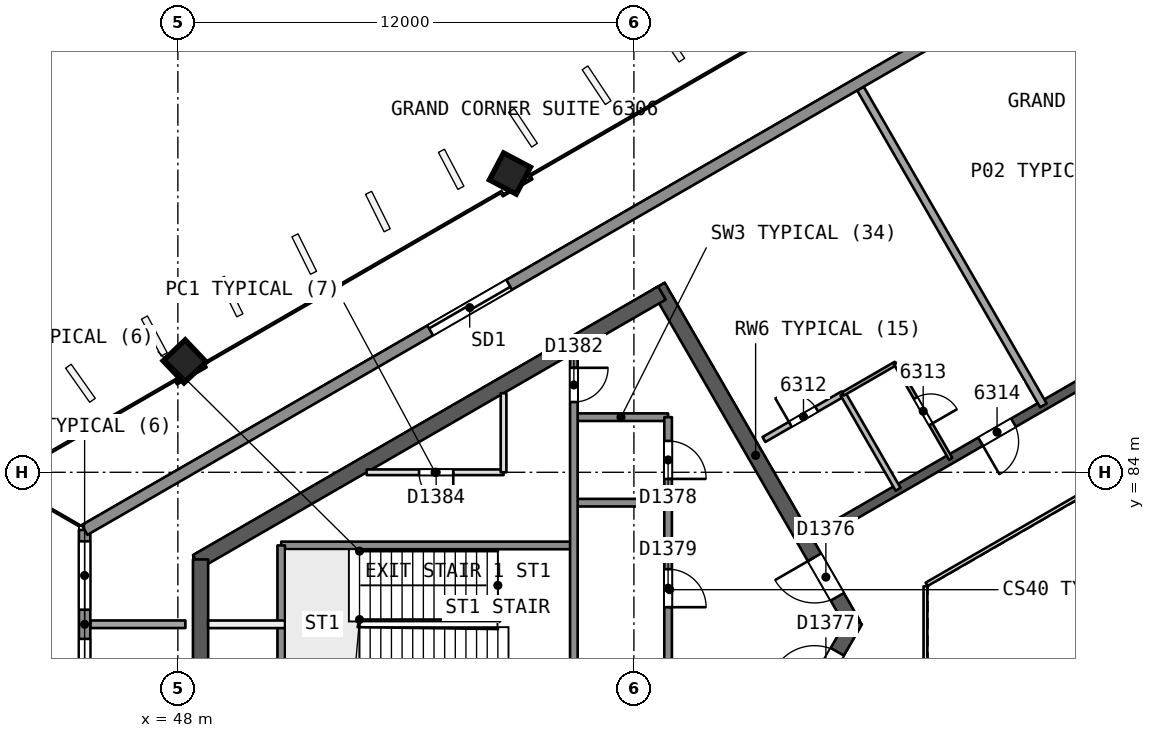
"""IFC4 building model, lengths in metres.
Left out: names, types, materials, properties, quantities, classifications, styles, units other than length and angle.
Written with IfcOpenShell. Run it as: python <this file> out.ifc"""

import sys

from ifc_helpers import new_model, si_unit, direction, frame, frame_2d, origin, origin_2d, place, context, subcontext, project, spatial, rectangle, extrude, element, fill, save


model = new_model("IFC4")
c1 = context("Model", 3, precision=1e-05, world=origin(), true_north=direction((0.0, 1.0)))
c2 = subcontext(c1, "Body", "Model", "MODEL_VIEW")
j1 = project(units=[si_unit("LENGTHUNIT", "METRE"), si_unit("PLANEANGLEUNIT", "RADIAN")], contexts=[c1])
p1 = place(None, origin())
s1 = spatial("IfcSite", under=j1, at=p1, CompositionType="ELEMENT")
p2 = place(p1, origin())
s2 = spatial("IfcBuilding", under=s1, at=p2, CompositionType="ELEMENT")
p3 = place(p2, frame((0.0, 0.0, 259.0)))
s3 = spatial("IfcBuildingStorey", under=s2, at=p3, CompositionType="ELEMENT", Elevation=259.0)
p4 = place(p3, frame((65.769, 80.0, 0.0), z_axis=(0.0, 0.0, 1.0), x_axis=(-0.50000177223, 0.866024380585, 0.0)))
e1 = element("IfcWall", 1, at=p4, inside=s3, PredefinedType="SHEAR", context=c2, shape_type="SweptSolid", body=[
    extrude(rectangle(XDim=10.265, YDim=0.4, at=frame_2d((5.132, 0.0))), origin(), (0.0, 0.0, 1.0), 3.7),
])
p5 = place(p4, frame((0.834, 0.0, 0.0)))
e2 = element("IfcOpeningElement", 2, at=p5, cuts=e1, PredefinedType="OPENING", context=c2, shape_type="SweptSolid", body=[
    extrude(rectangle(XDim=1.2, YDim=2.1, at=frame_2d((0.6, 1.05))), frame((0.0, 0.21, 0.0), z_axis=(0.0, -1.0, 0.0), x_axis=(1.0, 0.0, 0.0)), (0.0, 0.0, 1.0), 0.421),
])
p6 = place(p3, frame((60.737, 88.716, 0.0), z_axis=(0.0, 0.0, 1.0), x_axis=(-0.866028812667, -0.499994095595, 0.0)))
e3 = element("IfcWall", 3, at=p6, inside=s3, PredefinedType="SHEAR", context=c2, shape_type="SweptSolid", body=[
    extrude(rectangle(XDim=14.134, YDim=0.4, at=frame_2d((7.067, 0.0))), origin(), (0.0, 0.0, 1.0), 3.7),
])
p7 = place(p3, frame((48.597, 81.707, 0.0), z_axis=(0.0, 0.0, 1.0), x_axis=(0.0, -1.0, 0.0)))
e4 = element("IfcWall", 4, at=p7, inside=s3, PredefinedType="SHEAR", context=c2, shape_type="SweptSolid", body=[
    extrude(rectangle(XDim=3.53, YDim=0.4, at=frame_2d((1.765, 0.0))), origin(), (0.0, 0.0, 1.0), 3.7),
])
p8 = place(p3, frame((60.737, 71.284, 0.0), z_axis=(0.0, 0.0, 1.0), x_axis=(0.50000547566, 0.866022242388, 0.0)))
e5 = element("IfcWall", 5, at=p8, inside=s3, PredefinedType="SHEAR", context=c2, shape_type="SweptSolid", body=[
    extrude(rectangle(XDim=10.18, YDim=0.4, at=frame_2d((5.09, 0.0))), origin(), (0.0, 0.0, 1.0), 3.7),
])
p9 = place(p8, frame((8.03, 0.0, 0.0)))
e6 = element("IfcOpeningElement", 6, at=p9, cuts=e5, PredefinedType="OPENING", context=c2, shape_type="SweptSolid", body=[
    extrude(rectangle(XDim=1.2, YDim=2.1, at=frame_2d((0.6, 1.05))), frame((0.0, 0.21, 0.0), z_axis=(0.0, -1.0, 0.0), x_axis=(1.0, 0.0, 0.0)), (0.0, 0.0, 1.0), 0.421),
])
p10 = place(p3, frame((78.2, 90.046, 0.0), z_axis=(0.0, 0.0, 1.0), x_axis=(-0.866026492143, -0.499998114903, 0.0)))
e7 = element("IfcWall", 7, at=p10, inside=s3, PredefinedType="SHEAR", context=c2, shape_type="SweptSolid", body=[
    extrude(rectangle(XDim=15.588, YDim=0.25, at=frame_2d((7.794, 0.0))), origin(), (0.0, 0.0, 1.0), 3.3),
])
p11 = place(p10, frame((5.887, 0.0, 0.0)))
e8 = element("IfcOpeningElement", 8, at=p11, cuts=e7, PredefinedType="OPENING", context=c2, shape_type="SweptSolid", body=[
    extrude(rectangle(XDim=1.0, YDim=2.1, at=frame_2d((0.5, 1.05))), frame((0.0, 0.135, 0.0), z_axis=(0.0, -1.0, 0.0), x_axis=(1.0, 0.0, 0.0)), (0.0, 0.0, 1.0), 0.271),
])
p12 = place(p10, frame((9.481, 0.0, 0.0)))
e9 = element("IfcOpeningElement", 9, at=p12, cuts=e7, PredefinedType="OPENING", context=c2, shape_type="SweptSolid", body=[
    extrude(rectangle(XDim=1.0, YDim=2.1, at=frame_2d((0.5, 1.05))), frame((0.0, 0.135, 0.0), z_axis=(0.0, -1.0, 0.0), x_axis=(1.0, 0.0, 0.0)), (0.0, 0.0, 1.0), 0.271),
])
p13 = place(p3, frame((56.715, 91.875, 0.0), z_axis=(0.019328501455, -0.012204002625, 0.999738701537), x_axis=(-0.498096589224, 0.866885952098, 0.020212220507)))
e10 = element("IfcColumn", 10, at=p13, inside=s3, PredefinedType="COLUMN", context=c2, shape_type="SweptSolid", body=[
    extrude(rectangle(XDim=0.8, YDim=0.8, at=origin_2d()), origin(), (0.0, 0.0, 1.0), 3.701),
])
p14 = place(p3, frame((48.143, 86.926, 0.0), z_axis=(0.028559101991, -0.006859460986, 0.999568569678), x_axis=(-0.49850746064, 0.866650252321, 0.020190389752)))
e11 = element("IfcColumn", 11, at=p14, inside=s3, PredefinedType="COLUMN", context=c2, shape_type="SweptSolid", body=[
    extrude(rectangle(XDim=0.8, YDim=0.8, at=origin_2d()), origin(), (0.0, 0.0, 1.0), 3.702),
])
p15 = place(p3, frame((65.961, 94.097, 0.0), z_axis=(0.0, 0.0, 1.0), x_axis=(0.499987326052, -0.866032720968, 0.0)))
e12 = element("IfcWall", 12, at=p15, inside=s3, PredefinedType="PARTITIONING", context=c2, shape_type="SweptSolid", body=[
    extrude(rectangle(XDim=9.628, YDim=0.2, at=frame_2d((4.814, 0.0))), origin(), (0.0, 0.0, 1.0), 3.3),
])
p16 = place(p3, frame((63.422, 84.863, 0.0), z_axis=(0.0, 0.0, 1.0), x_axis=(0.865994240961, 0.500053971709, 0.0)))
e13 = element("IfcWall", 13, at=p16, inside=s3, PredefinedType="PARTITIONING", context=c2, shape_type="SweptSolid", body=[
    extrude(rectangle(XDim=2.401, YDim=0.15, at=frame_2d((1.201, 0.0))), origin(), (0.0, 0.0, 1.0), 3.3),
])
p17 = place(p16, frame((0.801, 0.0, 0.0)))
e14 = element("IfcOpeningElement", 14, at=p17, cuts=e13, PredefinedType="OPENING", context=c2, shape_type="SweptSolid", body=[
    extrude(rectangle(XDim=0.8, YDim=2.1, at=frame_2d((0.4, 1.05))), frame((0.0, 0.085, 0.0), z_axis=(0.0, -1.0, 0.0), x_axis=(1.0, 0.0, 0.0)), (0.0, 0.0, 1.0), 0.171),
])
p18 = place(p3, frame((65.502, 86.063, 0.0), z_axis=(0.0, 0.0, 1.0), x_axis=(0.866055983265, 0.499947031044, 0.0)))
e15 = element("IfcWall", 15, at=p18, inside=s3, PredefinedType="PARTITIONING", context=c2, shape_type="SweptSolid", body=[
    extrude(rectangle(XDim=1.6, YDim=0.1, at=frame_2d((0.8, 0.0))), origin(), (0.0, 0.0, 1.0), 3.3),
])
p19 = place(p3, frame((66.887, 86.863, 0.0), z_axis=(0.0, 0.0, 1.0), x_axis=(0.50005036918, -0.865996321171, 0.0)))
e16 = element("IfcWall", 16, at=p19, inside=s3, PredefinedType="PARTITIONING", context=c2, shape_type="SweptSolid", body=[
    extrude(rectangle(XDim=2.9, YDim=0.1, at=frame_2d((1.45, 0.0))), origin(), (0.0, 0.0, 1.0), 3.3),
])
p20 = place(p19, frame((1.05, 0.0, 0.0)))
e17 = element("IfcOpeningElement", 17, at=p20, cuts=e16, PredefinedType="OPENING", context=c2, shape_type="SweptSolid", body=[
    extrude(rectangle(XDim=0.8, YDim=2.1, at=frame_2d((0.4, 1.05))), frame((0.0, 0.061, 0.0), z_axis=(0.0, -1.0, 0.0), x_axis=(1.0, 0.0, 0.0)), (0.0, 0.0, 1.0), 0.121),
])
p21 = place(p3, frame((45.695, 80.001, 0.0), z_axis=(0.0, 0.0, 1.0), x_axis=(1.0, 0.0, 0.0)))
e18 = element("IfcWall", 18, at=p21, inside=s3, PredefinedType="PARTITIONING", context=c2, shape_type="SweptSolid", body=[
    extrude(rectangle(XDim=2.503, YDim=0.2, at=frame_2d((1.251, 0.0))), origin(), (0.0, 0.0, 1.0), 3.3),
])
p22 = place(p3, frame((66.952, 83.552, 0.0), z_axis=(0.0, 0.0, 1.0), x_axis=(-0.499987231761, 0.866032775405, 0.0)))
e19 = element("IfcWall", 19, at=p22, inside=s3, PredefinedType="PARTITIONING", context=c2, shape_type="SweptSolid", body=[
    extrude(rectangle(XDim=2.9, YDim=0.15, at=frame_2d((1.45, 0.0))), origin(), (0.0, 0.0, 1.0), 3.3),
])
p23 = place(p3, frame((45.546, 77.518, 0.0), z_axis=(0.0, 0.0, 1.0), x_axis=(0.0, 1.0, 0.0)))
e20 = element("IfcWall", 20, at=p23, inside=s3, PredefinedType="SOLIDWALL", context=c2, shape_type="SweptSolid", body=[
    extrude(rectangle(XDim=4.965, YDim=0.3, at=frame_2d((2.482, 0.0))), origin(), (0.0, 0.0, 1.0), 3.3),
])
p24 = place(p23, frame((2.866, 0.0, 0.9)))
e21 = element("IfcOpeningElement", 21, at=p24, cuts=e20, PredefinedType="OPENING", context=c2, shape_type="SweptSolid", body=[
    extrude(rectangle(XDim=1.8, YDim=1.5, at=frame_2d((0.9, 0.75))), frame((0.0, 0.161, 0.0), z_axis=(0.0, -1.0, 0.0), x_axis=(1.0, 0.0, 0.0)), (0.0, 0.0, 1.0), 0.321),
])
p25 = place(p23, frame((0.298, 0.0, 0.9)))
e22 = element("IfcOpeningElement", 22, at=p25, cuts=e20, PredefinedType="OPENING", context=c2, shape_type="SweptSolid", body=[
    extrude(rectangle(XDim=1.8, YDim=1.5, at=frame_2d((0.9, 0.75))), frame((0.0, 0.161, 0.0), z_axis=(0.0, -1.0, 0.0), x_axis=(1.0, 0.0, 0.0)), (0.0, 0.0, 1.0), 0.321),
])
p26 = place(p3, frame((45.546, 82.482, 0.0), z_axis=(0.0, 0.0, 1.0), x_axis=(0.86602550179, 0.499999830249, 0.0)))
e23 = element("IfcWall", 23, at=p26, inside=s3, PredefinedType="SOLIDWALL", context=c2, shape_type="SweptSolid", body=[
    extrude(rectangle(XDim=48.533, YDim=0.3, at=frame_2d((24.267, 0.0))), origin(), (0.0, 0.0, 1.0), 3.3),
])
p27 = place(p26, frame((34.854, 0.0, 0.0)))
e24 = element("IfcOpeningElement", 24, at=p27, cuts=e23, PredefinedType="OPENING", context=c2, shape_type="SweptSolid", body=[
    extrude(rectangle(XDim=2.4, YDim=2.4, at=frame_2d((1.2, 1.2))), frame((0.0, 0.161, 0.0), z_axis=(0.0, -1.0, 0.0), x_axis=(1.0, 0.0, 0.0)), (0.0, 0.0, 1.0), 0.321),
])
p28 = place(p26, frame((10.5, 0.0, 0.0)))
e25 = element("IfcOpeningElement", 25, at=p28, cuts=e23, PredefinedType="OPENING", context=c2, shape_type="SweptSolid", body=[
    extrude(rectangle(XDim=2.4, YDim=2.4, at=frame_2d((1.2, 1.2))), frame((0.0, 0.161, 0.0), z_axis=(0.0, -1.0, 0.0), x_axis=(1.0, 0.0, 0.0)), (0.0, 0.0, 1.0), 0.321),
])
p29 = place(p3, frame((60.9, 85.45, 0.0), z_axis=(0.0, 0.0, 1.0), x_axis=(-1.0, 0.0, 0.0)))
e26 = element("IfcWall", 26, at=p29, inside=s3, PredefinedType="SOLIDWALL", context=c2, shape_type="SweptSolid", body=[
    extrude(rectangle(XDim=2.48, YDim=0.2, at=frame_2d((1.24, 0.0))), origin(), (0.0, 0.0, 1.0), 3.3),
])
p30 = place(p3, frame((56.57, 84.0, 0.0), z_axis=(0.0, 0.0, 1.0), x_axis=(-1.0, 0.0, 0.0)))
e27 = element("IfcWall", 27, at=p30, inside=s3, PredefinedType="PARTITIONING", context=c2, shape_type="SweptSolid", body=[
    extrude(rectangle(XDim=3.602, YDim=0.15, at=frame_2d((1.801, 0.0))), origin(), (0.0, 0.0, 1.0), 3.3),
])
p31 = place(p30, frame((1.323, 0.0, 0.0)))
e28 = element("IfcOpeningElement", 28, at=p31, cuts=e27, PredefinedType="OPENING", context=c2, shape_type="SweptSolid", body=[
    extrude(rectangle(XDim=0.9, YDim=2.1, at=frame_2d((0.45, 1.05))), frame((0.0, 0.085, 0.0), z_axis=(0.0, -1.0, 0.0), x_axis=(1.0, 0.0, 0.0)), (0.0, 0.0, 1.0), 0.171),
])
p32 = place(p3, frame((60.9, 83.2, 0.0), z_axis=(0.0, 0.0, 1.0), x_axis=(-1.0, 0.0, 0.0)))
e29 = element("IfcWall", 29, at=p32, inside=s3, PredefinedType="SOLIDWALL", context=c2, shape_type="SweptSolid", body=[
    extrude(rectangle(XDim=2.48, YDim=0.2, at=frame_2d((1.24, 0.0))), origin(), (0.0, 0.0, 1.0), 3.3),
])
p33 = place(p3, frame((58.42, 82.075, 0.0), z_axis=(0.0, 0.0, 1.0), x_axis=(-1.0, 0.0, 0.0)))
e30 = element("IfcWall", 30, at=p33, inside=s3, PredefinedType="SOLIDWALL", context=c2, shape_type="SweptSolid", body=[
    extrude(rectangle(XDim=7.7, YDim=0.2, at=frame_2d((3.85, 0.0))), origin(), (0.0, 0.0, 1.0), 3.3),
])
p34 = place(p3, frame((50.82, 80.0, 0.0), z_axis=(0.0, 0.0, 1.0), x_axis=(-1.0, 0.0, 0.0)))
e31 = element("IfcWall", 31, at=p34, inside=s3, PredefinedType="PARTITIONING", context=c2, shape_type="SweptSolid", body=[
    extrude(rectangle(XDim=2.023, YDim=0.2, at=frame_2d((1.012, 0.0))), origin(), (0.0, 0.0, 1.0), 3.3),
])
p35 = place(p3, frame((60.9, 85.45, 0.0), z_axis=(0.0, 0.0, 1.0), x_axis=(0.0, -1.0, 0.0)))
e32 = element("IfcWall", 32, at=p35, inside=s3, PredefinedType="SOLIDWALL", context=c2, shape_type="SweptSolid", body=[
    extrude(rectangle(XDim=10.9, YDim=0.2, at=frame_2d((5.45, 0.0))), origin(), (0.0, 0.0, 1.0), 3.3),
])
p36 = place(p35, frame((0.625, 0.0, 0.0)))
e33 = element("IfcOpeningElement", 33, at=p36, cuts=e32, PredefinedType="OPENING", context=c2, shape_type="SweptSolid", body=[
    extrude(rectangle(XDim=1.0, YDim=2.1, at=frame_2d((0.5, 1.05))), frame((0.0, 0.11, 0.0), z_axis=(0.0, -1.0, 0.0), x_axis=(1.0, 0.0, 0.0)), (0.0, 0.0, 1.0), 0.221),
])
p37 = place(p35, frame((4.0, 0.0, 0.0)))
e34 = element("IfcOpeningElement", 34, at=p37, cuts=e32, PredefinedType="OPENING", context=c2, shape_type="SweptSolid", body=[
    extrude(rectangle(XDim=1.0, YDim=2.1, at=frame_2d((0.5, 1.05))), frame((0.0, 0.11, 0.0), z_axis=(0.0, -1.0, 0.0), x_axis=(1.0, 0.0, 0.0)), (0.0, 0.0, 1.0), 0.221),
])
p38 = place(p35, frame((7.375, 0.0, 0.0)))
e35 = element("IfcOpeningElement", 35, at=p38, cuts=e32, PredefinedType="OPENING", context=c2, shape_type="SweptSolid", body=[
    extrude(rectangle(XDim=1.0, YDim=2.1, at=frame_2d((0.5, 1.05))), frame((0.0, 0.11, 0.0), z_axis=(0.0, -1.0, 0.0), x_axis=(1.0, 0.0, 0.0)), (0.0, 0.0, 1.0), 0.221),
])
p39 = place(p3, frame((58.42, 87.148, 0.0), z_axis=(0.0, 0.0, 1.0), x_axis=(0.0, -1.0, 0.0)))
e36 = element("IfcWall", 36, at=p39, inside=s3, PredefinedType="SOLIDWALL", context=c2, shape_type="SweptSolid", body=[
    extrude(rectangle(XDim=10.698, YDim=0.2, at=frame_2d((5.349, 0.0))), origin(), (0.0, 0.0, 1.0), 3.3),
])
p40 = place(p39, frame((0.399, 0.0, 0.0)))
e37 = element("IfcOpeningElement", 37, at=p40, cuts=e36, PredefinedType="OPENING", context=c2, shape_type="SweptSolid", body=[
    extrude(rectangle(XDim=0.9, YDim=2.1, at=frame_2d((0.45, 1.05))), frame((0.0, 0.11, 0.0), z_axis=(0.0, -1.0, 0.0), x_axis=(1.0, 0.0, 0.0)), (0.0, 0.0, 1.0), 0.221),
])
p41 = place(p3, frame((56.57, 86.08, 0.0), z_axis=(0.0, 0.0, 1.0), x_axis=(0.0, -1.0, 0.0)))
e38 = element("IfcWall", 38, at=p41, inside=s3, PredefinedType="PARTITIONING", context=c2, shape_type="SweptSolid", body=[
    extrude(rectangle(XDim=2.08, YDim=0.15, at=frame_2d((1.04, 0.0))), origin(), (0.0, 0.0, 1.0), 3.3),
])
p42 = place(p3, frame((50.72, 82.075, 0.0), z_axis=(0.0, 0.0, 1.0), x_axis=(0.0, -1.0, 0.0)))
e39 = element("IfcWall", 39, at=p42, inside=s3, PredefinedType="SOLIDWALL", context=c2, shape_type="SweptSolid", body=[
    extrude(rectangle(XDim=4.15, YDim=0.2, at=frame_2d((2.075, 0.0))), origin(), (0.0, 0.0, 1.0), 3.3),
])
p43 = place(p3, frame((77.738, 86.846, 0.0), z_axis=(0.0, 0.0, 1.0), x_axis=(-0.866026658274, -0.499997827154, 0.0)))
e40 = element("IfcWall", 40, at=p43, inside=s3, PredefinedType="PARTITIONING", context=c2, shape_type="SweptSolid", body=[
    extrude(rectangle(XDim=11.588, YDim=0.1, at=frame_2d((5.794, 0.0))), origin(), (0.0, 0.0, 1.0), 3.3),
])
p44 = place(p3, frame((67.672, 81.0, 0.0), z_axis=(0.0, 0.0, 1.0), x_axis=(0.0, -1.0, 0.0)))
e41 = element("IfcWall", 41, at=p44, inside=s3, PredefinedType="PARTITIONING", context=c2, shape_type="SweptSolid", body=[
    extrude(rectangle(XDim=2.0, YDim=0.1, at=frame_2d((1.0, 0.0))), origin(), (0.0, 0.0, 1.0), 3.3),
])
p45 = place(p17, origin())
e42 = element("IfcDoor", 42, at=p45, inside=s3, OperationType="SINGLE_SWING_LEFT", PredefinedType="NOTDEFINED", context=c2, shape_type="SweptSolid", body=[
    extrude(rectangle(XDim=0.8, YDim=2.1, at=frame_2d((0.4, 1.05))), frame((0.0, 0.025, 0.0), z_axis=(0.0, -1.0, 0.0), x_axis=(1.0, 0.0, 0.0)), (0.0, 0.0, 1.0), 0.05),
])
fill(e14, e42)
p46 = place(p20, origin())
e43 = element("IfcDoor", 43, at=p46, inside=s3, OperationType="SINGLE_SWING_RIGHT", PredefinedType="NOTDEFINED", context=c2, shape_type="SweptSolid", body=[
    extrude(rectangle(XDim=0.8, YDim=2.1, at=frame_2d((0.4, 1.05))), frame((0.0, 0.025, 0.0), z_axis=(0.0, -1.0, 0.0), x_axis=(1.0, 0.0, 0.0)), (0.0, 0.0, 1.0), 0.05),
])
fill(e17, e43)
p47 = place(p12, origin())
e44 = element("IfcDoor", 44, at=p47, inside=s3, OperationType="SINGLE_SWING_RIGHT", PredefinedType="NOTDEFINED", context=c2, shape_type="SweptSolid", body=[
    extrude(rectangle(XDim=1.0, YDim=2.1, at=frame_2d((0.5, 1.05))), frame((0.0, 0.025, 0.0), z_axis=(0.0, -1.0, 0.0), x_axis=(1.0, 0.0, 0.0)), (0.0, 0.0, 1.0), 0.05),
])
fill(e9, e44)
p48 = place(p24, origin())
e45 = element("IfcWindow", 45, at=p48, inside=s3, PartitioningType="SINGLE_PANEL", PredefinedType="WINDOW", context=c2, shape_type="SweptSolid", body=[
    extrude(rectangle(XDim=1.8, YDim=1.5, at=frame_2d((0.9, 0.75))), frame((0.0, 0.03, 0.0), z_axis=(0.0, -1.0, 0.0), x_axis=(1.0, 0.0, 0.0)), (0.0, 0.0, 1.0), 0.06),
])
fill(e21, e45)
p49 = place(p25, origin())
e46 = element("IfcWindow", 46, at=p49, inside=s3, PartitioningType="SINGLE_PANEL", PredefinedType="WINDOW", context=c2, shape_type="SweptSolid", body=[
    extrude(rectangle(XDim=1.8, YDim=1.5, at=frame_2d((0.9, 0.75))), frame((0.0, 0.03, 0.0), z_axis=(0.0, -1.0, 0.0), x_axis=(1.0, 0.0, 0.0)), (0.0, 0.0, 1.0), 0.06),
])
fill(e22, e46)
p50 = place(p28, origin())
e47 = element("IfcDoor", 47, at=p50, inside=s3, OperationType="SLIDING_TO_RIGHT", PredefinedType="NOTDEFINED", context=c2, shape_type="SweptSolid", body=[
    extrude(rectangle(XDim=2.4, YDim=2.4, at=frame_2d((1.2, 1.2))), frame((0.0, 0.025, 0.0), z_axis=(0.0, -1.0, 0.0), x_axis=(1.0, 0.0, 0.0)), (0.0, 0.0, 1.0), 0.05),
])
fill(e25, e47)
p51 = place(p5, origin())
e48 = element("IfcDoor", 48, at=p51, inside=s3, OperationType="SINGLE_SWING_RIGHT", PredefinedType="NOTDEFINED", context=c2, shape_type="SweptSolid", body=[
    extrude(rectangle(XDim=1.2, YDim=2.1, at=frame_2d((0.6, 1.05))), frame((0.0, 0.025, 0.0), z_axis=(0.0, -1.0, 0.0), x_axis=(1.0, 0.0, 0.0)), (0.0, 0.0, 1.0), 0.05),
])
fill(e2, e48)
p52 = place(p9, origin())
e49 = element("IfcDoor", 49, at=p52, inside=s3, OperationType="SINGLE_SWING_LEFT", PredefinedType="NOTDEFINED", context=c2, shape_type="SweptSolid", body=[
    extrude(rectangle(XDim=1.2, YDim=2.1, at=frame_2d((0.6, 1.05))), frame((0.0, 0.025, 0.0), z_axis=(0.0, -1.0, 0.0), x_axis=(1.0, 0.0, 0.0)), (0.0, 0.0, 1.0), 0.05),
])
fill(e6, e49)
p53 = place(p36, origin())
e50 = element("IfcDoor", 50, at=p53, inside=s3, OperationType="SINGLE_SWING_RIGHT", PredefinedType="NOTDEFINED", context=c2, shape_type="SweptSolid", body=[
    extrude(rectangle(XDim=1.0, YDim=2.1, at=frame_2d((0.5, 1.05))), frame((0.0, 0.025, 0.0), z_axis=(0.0, -1.0, 0.0), x_axis=(1.0, 0.0, 0.0)), (0.0, 0.0, 1.0), 0.05),
])
fill(e33, e50)
p54 = place(p37, origin())
e51 = element("IfcDoor", 51, at=p54, inside=s3, OperationType="SINGLE_SWING_RIGHT", PredefinedType="NOTDEFINED", context=c2, shape_type="SweptSolid", body=[
    extrude(rectangle(XDim=1.0, YDim=2.1, at=frame_2d((0.5, 1.05))), frame((0.0, 0.025, 0.0), z_axis=(0.0, -1.0, 0.0), x_axis=(1.0, 0.0, 0.0)), (0.0, 0.0, 1.0), 0.05),
])
fill(e34, e51)
p55 = place(p40, origin())
e52 = element("IfcDoor", 52, at=p55, inside=s3, OperationType="SINGLE_SWING_LEFT", PredefinedType="NOTDEFINED", context=c2, shape_type="SweptSolid", body=[
    extrude(rectangle(XDim=0.9, YDim=2.1, at=frame_2d((0.45, 1.05))), frame((0.0, 0.025, 0.0), z_axis=(0.0, -1.0, 0.0), x_axis=(1.0, 0.0, 0.0)), (0.0, 0.0, 1.0), 0.05),
])
fill(e37, e52)
p56 = place(p31, origin())
e53 = element("IfcDoor", 53, at=p56, inside=s3, OperationType="SINGLE_SWING_LEFT", PredefinedType="NOTDEFINED", context=c2, shape_type="SweptSolid", body=[
    extrude(rectangle(XDim=0.9, YDim=2.1, at=frame_2d((0.45, 1.05))), frame((0.0, 0.025, 0.0), z_axis=(0.0, -1.0, 0.0), x_axis=(1.0, 0.0, 0.0)), (0.0, 0.0, 1.0), 0.05),
])
fill(e28, e53)
save(model, sys.argv[1])
